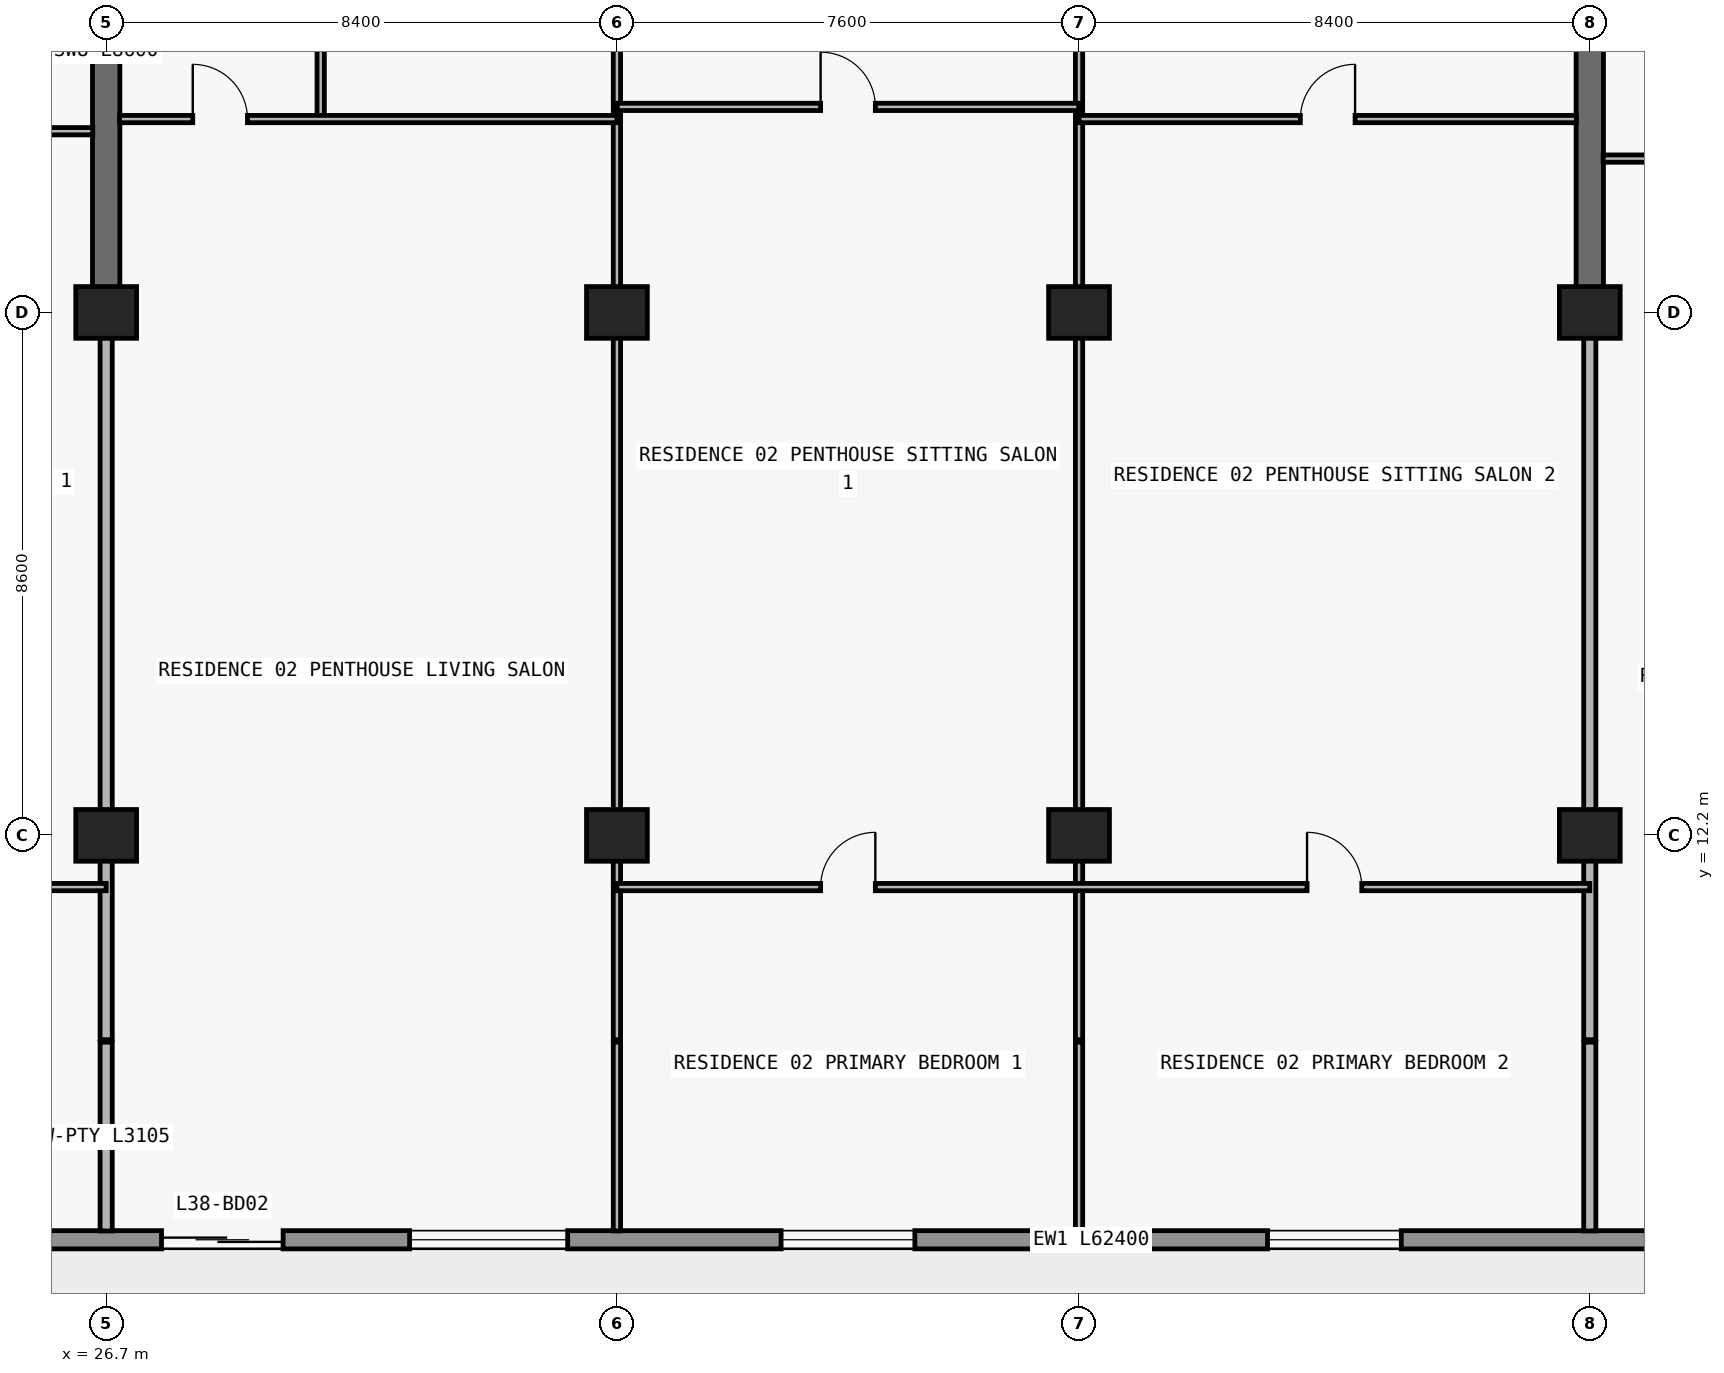
"""IFC4 building model, lengths in metres.
Left out: names, types, materials, properties, quantities, classifications, styles, units other than length and angle.
Written with IfcOpenShell. Run it as: python <this file> out.ifc"""

import sys

from ifc_helpers import new_model, si_unit, direction, frame, frame_2d, origin, origin_2d, place, context, subcontext, project, spatial, rectangle, extrude, element, fill, save


model = new_model("IFC4")
c1 = context("Model", 3, precision=1e-05, world=origin(), true_north=direction((0.0, 1.0)))
c2 = subcontext(c1, "Body", "Model", "MODEL_VIEW")
j1 = project(units=[si_unit("LENGTHUNIT", "METRE"), si_unit("PLANEANGLEUNIT", "RADIAN")], contexts=[c1])
p1 = place(None, origin())
s1 = spatial("IfcSite", under=j1, at=p1, CompositionType="ELEMENT")
p2 = place(p1, origin())
s2 = spatial("IfcBuilding", under=s1, at=p2, CompositionType="ELEMENT")
p3 = place(p2, frame((0.0, 0.0, 138.9)))
s3 = spatial("IfcBuildingStorey", under=s2, at=p3, CompositionType="ELEMENT", Elevation=138.9)
for number, where, z_axis, x_axis in (
    (1, (26.7, 12.2, 0.0), (0.0, 0.0, 1.0), (1.0, 0.0, 0.0)),
    (2, (35.1, 12.2, 0.0), (0.0, 0.0, 1.0), (1.0, 0.0, 0.0)),
    (3, (42.7, 12.2, 0.0), (0.0, 0.0, 1.0), (1.0, 0.0, 0.0)),
    (4, (51.1, 12.2, 0.0), (0.0, 0.0, 1.0), (1.0, 0.0, 0.0)),
    (5, (26.7, 20.8, 0.0), (0.0, 0.0, 1.0), (1.0, 0.0, 0.0)),
    (6, (35.1, 20.8, 0.0), (0.0, 0.0, 1.0), (1.0, 0.0, 0.0)),
    (7, (42.7, 20.8, 0.0), (0.0, 0.0, 1.0), (1.0, 0.0, 0.0)),
    (8, (51.1, 20.8, 0.0), (0.0, 0.0, 1.0), (1.0, 0.0, 0.0)),
):
    element("IfcColumn", number, at=place(p3, frame(where, z_axis=z_axis, x_axis=x_axis)), inside=s3, PredefinedType="COLUMN", context=c2, shape_type="SweptSolid", body=[
        extrude(rectangle(XDim=1.0, YDim=0.85, at=origin_2d()), origin(), (0.0, 0.0, 1.0), 3.05),
    ])
for number, where, z_axis, x_axis in (
    (9, (26.7, 20.8, 0.0), (0.0, 0.0, 1.0), (0.0, 1.0, 0.0)),
    (10, (51.1, 20.8, 0.0), (0.0, 0.0, 1.0), (0.0, 1.0, 0.0)),
):
    element("IfcWall", number, at=place(p3, frame(where, z_axis=z_axis, x_axis=x_axis)), inside=s3, PredefinedType="SHEAR", context=c2, shape_type="SweptSolid", body=[
        extrude(rectangle(XDim=8.6, YDim=0.45, at=frame_2d((4.3, 0.0))), origin(), (0.0, 0.0, 1.0), 3.05),
    ])
p4 = place(p3, frame((70.1, 5.55, 0.0), z_axis=(0.0, 0.0, 1.0), x_axis=(-1.0, 0.0, 0.0)))
e11 = element("IfcWall", 11, at=p4, inside=s3, PredefinedType="STANDARD", context=c2, shape_type="SweptSolid", body=[
    extrude(rectangle(XDim=62.4, YDim=0.3, at=frame_2d((31.2, 0.0))), origin(), (0.0, 0.0, 1.0), 3.05),
])
p5 = place(p4, frame((57.29, 0.0, 0.0)))
e12 = element("IfcOpeningElement", 12, at=p5, cuts=e11, PredefinedType="OPENING", context=c2, shape_type="SweptSolid", body=[
    extrude(rectangle(XDim=2.0, YDim=2.3, at=frame_2d((1.0, 1.15))), frame((0.0, 0.16, 0.0), z_axis=(0.0, -1.0, 0.0), x_axis=(1.0, 0.0, 0.0)), (0.0, 0.0, 1.0), 0.32),
])
p6 = place(p4, frame((52.61, 0.0, 0.65)))
e13 = element("IfcOpeningElement", 13, at=p6, cuts=e11, PredefinedType="OPENING", context=c2, shape_type="SweptSolid", body=[
    extrude(rectangle(XDim=2.6, YDim=1.85, at=frame_2d((1.3, 0.925))), frame((0.0, 0.16, 0.0), z_axis=(0.0, -1.0, 0.0), x_axis=(1.0, 0.0, 0.0)), (0.0, 0.0, 1.0), 0.32),
])
p7 = place(p4, frame((46.5, 0.0, 0.85)))
e14 = element("IfcOpeningElement", 14, at=p7, cuts=e11, PredefinedType="OPENING", context=c2, shape_type="SweptSolid", body=[
    extrude(rectangle(XDim=2.2, YDim=1.55, at=frame_2d((1.1, 0.775))), frame((0.0, 0.16, 0.0), z_axis=(0.0, -1.0, 0.0), x_axis=(1.0, 0.0, 0.0)), (0.0, 0.0, 1.0), 0.32),
])
p8 = place(p4, frame((40.49, 0.0, 0.0)))
e15 = element("IfcOpeningElement", 15, at=p8, cuts=e11, PredefinedType="OPENING", context=c2, shape_type="SweptSolid", body=[
    extrude(rectangle(XDim=2.0, YDim=2.3, at=frame_2d((1.0, 1.15))), frame((0.0, 0.16, 0.0), z_axis=(0.0, -1.0, 0.0), x_axis=(1.0, 0.0, 0.0)), (0.0, 0.0, 1.0), 0.32),
])
p9 = place(p4, frame((35.81, 0.0, 0.65)))
e16 = element("IfcOpeningElement", 16, at=p9, cuts=e11, PredefinedType="OPENING", context=c2, shape_type="SweptSolid", body=[
    extrude(rectangle(XDim=2.6, YDim=1.85, at=frame_2d((1.3, 0.925))), frame((0.0, 0.16, 0.0), z_axis=(0.0, -1.0, 0.0), x_axis=(1.0, 0.0, 0.0)), (0.0, 0.0, 1.0), 0.32),
])
p10 = place(p4, frame((30.1, 0.0, 0.85)))
e17 = element("IfcOpeningElement", 17, at=p10, cuts=e11, PredefinedType="OPENING", context=c2, shape_type="SweptSolid", body=[
    extrude(rectangle(XDim=2.2, YDim=1.55, at=frame_2d((1.1, 0.775))), frame((0.0, 0.16, 0.0), z_axis=(0.0, -1.0, 0.0), x_axis=(1.0, 0.0, 0.0)), (0.0, 0.0, 1.0), 0.32),
])
p11 = place(p4, frame((22.1, 0.0, 0.85)))
e18 = element("IfcOpeningElement", 18, at=p11, cuts=e11, PredefinedType="OPENING", context=c2, shape_type="SweptSolid", body=[
    extrude(rectangle(XDim=2.2, YDim=1.55, at=frame_2d((1.1, 0.775))), frame((0.0, 0.16, 0.0), z_axis=(0.0, -1.0, 0.0), x_axis=(1.0, 0.0, 0.0)), (0.0, 0.0, 1.0), 0.32),
])
p12 = place(p4, frame((16.026, 0.0, 0.0)))
e19 = element("IfcOpeningElement", 19, at=p12, cuts=e11, PredefinedType="OPENING", context=c2, shape_type="SweptSolid", body=[
    extrude(rectangle(XDim=2.0, YDim=2.3, at=frame_2d((1.0, 1.15))), frame((0.0, 0.16, 0.0), z_axis=(0.0, -1.0, 0.0), x_axis=(1.0, 0.0, 0.0)), (0.0, 0.0, 1.0), 0.32),
])
p13 = place(p4, frame((11.726, 0.0, 0.85)))
e20 = element("IfcOpeningElement", 20, at=p13, cuts=e11, PredefinedType="OPENING", context=c2, shape_type="SweptSolid", body=[
    extrude(rectangle(XDim=2.2, YDim=1.55, at=frame_2d((1.1, 0.775))), frame((0.0, 0.16, 0.0), z_axis=(0.0, -1.0, 0.0), x_axis=(1.0, 0.0, 0.0)), (0.0, 0.0, 1.0), 0.32),
])
p14 = place(p4, frame((7.29, 0.0, 0.0)))
e21 = element("IfcOpeningElement", 21, at=p14, cuts=e11, PredefinedType="OPENING", context=c2, shape_type="SweptSolid", body=[
    extrude(rectangle(XDim=2.0, YDim=2.3, at=frame_2d((1.0, 1.15))), frame((0.0, 0.16, 0.0), z_axis=(0.0, -1.0, 0.0), x_axis=(1.0, 0.0, 0.0)), (0.0, 0.0, 1.0), 0.32),
])
p15 = place(p4, frame((3.19, 0.0, 0.85)))
e22 = element("IfcOpeningElement", 22, at=p15, cuts=e11, PredefinedType="OPENING", context=c2, shape_type="SweptSolid", body=[
    extrude(rectangle(XDim=1.8, YDim=1.55, at=frame_2d((0.9, 0.775))), frame((0.0, 0.16, 0.0), z_axis=(0.0, -1.0, 0.0), x_axis=(1.0, 0.0, 0.0)), (0.0, 0.0, 1.0), 0.32),
])
p16 = place(p3, frame((26.7, 5.695, 0.0), z_axis=(0.0, 0.0, 1.0), x_axis=(0.0, 1.0, 0.0)))
e23 = element("IfcWall", 23, at=p16, inside=s3, PredefinedType="PARTITIONING", context=c2, shape_type="SweptSolid", body=[
    extrude(rectangle(XDim=3.105, YDim=0.2, at=frame_2d((1.552, 0.0))), origin(), (0.0, 0.0, 1.0), 3.05),
])
p17 = place(p3, frame((26.7, 8.84, 0.0), z_axis=(0.0, 0.0, 1.0), x_axis=(0.0, 1.0, 0.0)))
e24 = element("IfcWall", 24, at=p17, inside=s3, PredefinedType="PARTITIONING", context=c2, shape_type="SweptSolid", body=[
    extrude(rectangle(XDim=11.955, YDim=0.2, at=frame_2d((5.978, 0.0))), origin(), (0.0, 0.0, 1.0), 2.174),
])
p18 = place(p3, frame((30.228, 23.98, 0.0), z_axis=(0.0, 0.0, 1.0), x_axis=(0.0, 1.0, 0.0)))
e25 = element("IfcWall", 25, at=p18, inside=s3, PredefinedType="PARTITIONING", context=c2, shape_type="SweptSolid", body=[
    extrude(rectangle(XDim=4.8, YDim=0.12, at=frame_2d((2.4, 0.0))), origin(), (0.0, 0.0, 1.0), 3.05),
])
p19 = place(p18, frame((1.95, 0.0, 0.0)))
e26 = element("IfcOpeningElement", 26, at=p19, cuts=e25, PredefinedType="OPENING", context=c2, shape_type="SweptSolid", body=[
    extrude(rectangle(XDim=0.9, YDim=2.15, at=frame_2d((0.45, 1.075))), frame((0.0, 0.07, 0.0), z_axis=(0.0, -1.0, 0.0), x_axis=(1.0, 0.0, 0.0)), (0.0, 0.0, 1.0), 0.14),
])
p20 = place(p3, frame((35.1, 5.695, 0.0), z_axis=(0.0, 0.0, 1.0), x_axis=(0.0, 1.0, 0.0)))
e27 = element("IfcWall", 27, at=p20, inside=s3, PredefinedType="PARTITIONING", context=c2, shape_type="SweptSolid", body=[
    extrude(rectangle(XDim=3.105, YDim=0.12, at=frame_2d((1.552, 0.0))), origin(), (0.0, 0.0, 1.0), 3.05),
])
p21 = place(p3, frame((35.1, 8.84, 0.0), z_axis=(0.0, 0.0, 1.0), x_axis=(0.0, 1.0, 0.0)))
e28 = element("IfcWall", 28, at=p21, inside=s3, PredefinedType="PARTITIONING", context=c2, shape_type="SweptSolid", body=[
    extrude(rectangle(XDim=19.94, YDim=0.12, at=frame_2d((9.97, 0.0))), origin(), (0.0, 0.0, 1.0), 2.174),
])
p22 = place(p21, frame((17.09, 0.0, 0.0)))
e29 = element("IfcOpeningElement", 29, at=p22, cuts=e28, PredefinedType="OPENING", context=c2, shape_type="SweptSolid", body=[
    extrude(rectangle(XDim=0.9, YDim=2.124, at=frame_2d((0.45, 1.062))), frame((0.0, 0.07, 0.0), z_axis=(0.0, -1.0, 0.0), x_axis=(1.0, 0.0, 0.0)), (0.0, 0.0, 1.0), 0.14),
])
p23 = place(p3, frame((42.7, 5.695, 0.0), z_axis=(0.0, 0.0, 1.0), x_axis=(0.0, 1.0, 0.0)))
e30 = element("IfcWall", 30, at=p23, inside=s3, PredefinedType="PARTITIONING", context=c2, shape_type="SweptSolid", body=[
    extrude(rectangle(XDim=3.105, YDim=0.12, at=frame_2d((1.552, 0.0))), origin(), (0.0, 0.0, 1.0), 3.05),
])
p24 = place(p3, frame((42.7, 8.84, 0.0), z_axis=(0.0, 0.0, 1.0), x_axis=(0.0, 1.0, 0.0)))
e31 = element("IfcWall", 31, at=p24, inside=s3, PredefinedType="PARTITIONING", context=c2, shape_type="SweptSolid", body=[
    extrude(rectangle(XDim=19.94, YDim=0.12, at=frame_2d((9.97, 0.0))), origin(), (0.0, 0.0, 1.0), 2.174),
])
p25 = place(p24, frame((17.09, 0.0, 0.0)))
e32 = element("IfcOpeningElement", 32, at=p25, cuts=e31, PredefinedType="OPENING", context=c2, shape_type="SweptSolid", body=[
    extrude(rectangle(XDim=0.9, YDim=2.124, at=frame_2d((0.45, 1.062))), frame((0.0, 0.07, 0.0), z_axis=(0.0, -1.0, 0.0), x_axis=(1.0, 0.0, 0.0)), (0.0, 0.0, 1.0), 0.14),
])
p26 = place(p3, frame((51.1, 5.695, 0.0), z_axis=(0.0, 0.0, 1.0), x_axis=(0.0, 1.0, 0.0)))
e33 = element("IfcWall", 33, at=p26, inside=s3, PredefinedType="PARTITIONING", context=c2, shape_type="SweptSolid", body=[
    extrude(rectangle(XDim=3.105, YDim=0.2, at=frame_2d((1.552, 0.0))), origin(), (0.0, 0.0, 1.0), 3.05),
])
p27 = place(p3, frame((51.1, 8.84, 0.0), z_axis=(0.0, 0.0, 1.0), x_axis=(0.0, 1.0, 0.0)))
e34 = element("IfcWall", 34, at=p27, inside=s3, PredefinedType="PARTITIONING", context=c2, shape_type="SweptSolid", body=[
    extrude(rectangle(XDim=11.955, YDim=0.2, at=frame_2d((5.978, 0.0))), origin(), (0.0, 0.0, 1.0), 2.174),
])
p28 = place(p3, frame((18.3, 11.35, 0.0), z_axis=(0.0, 0.0, 1.0), x_axis=(1.0, 0.0, 0.0)))
e35 = element("IfcWall", 35, at=p28, inside=s3, PredefinedType="PARTITIONING", context=c2, shape_type="SweptSolid", body=[
    extrude(rectangle(XDim=8.4, YDim=0.12, at=frame_2d((4.2, 0.0))), origin(), (0.0, 0.0, 1.0), 3.05),
])
p29 = place(p28, frame((3.75, 0.0, 0.0)))
e36 = element("IfcOpeningElement", 36, at=p29, cuts=e35, PredefinedType="OPENING", context=c2, shape_type="SweptSolid", body=[
    extrude(rectangle(XDim=0.9, YDim=2.15, at=frame_2d((0.45, 1.075))), frame((0.0, 0.07, 0.0), z_axis=(0.0, -1.0, 0.0), x_axis=(1.0, 0.0, 0.0)), (0.0, 0.0, 1.0), 0.14),
])
p30 = place(p3, frame((35.1, 11.35, 0.0), z_axis=(0.0, 0.0, 1.0), x_axis=(1.0, 0.0, 0.0)))
e37 = element("IfcWall", 37, at=p30, inside=s3, PredefinedType="PARTITIONING", context=c2, shape_type="SweptSolid", body=[
    extrude(rectangle(XDim=16.0, YDim=0.12, at=frame_2d((8.0, 0.0))), origin(), (0.0, 0.0, 1.0), 3.05),
])
p31 = place(p30, frame((3.35, 0.0, 0.0)))
e38 = element("IfcOpeningElement", 38, at=p31, cuts=e37, PredefinedType="OPENING", context=c2, shape_type="SweptSolid", body=[
    extrude(rectangle(XDim=0.9, YDim=2.15, at=frame_2d((0.45, 1.075))), frame((0.0, 0.07, 0.0), z_axis=(0.0, -1.0, 0.0), x_axis=(1.0, 0.0, 0.0)), (0.0, 0.0, 1.0), 0.14),
])
p32 = place(p30, frame((11.35, 0.0, 0.0)))
e39 = element("IfcOpeningElement", 39, at=p32, cuts=e37, PredefinedType="OPENING", context=c2, shape_type="SweptSolid", body=[
    extrude(rectangle(XDim=0.9, YDim=2.15, at=frame_2d((0.45, 1.075))), frame((0.0, 0.07, 0.0), z_axis=(0.0, -1.0, 0.0), x_axis=(1.0, 0.0, 0.0)), (0.0, 0.0, 1.0), 0.14),
])
p33 = place(p3, frame((51.32, 23.33, 0.0), z_axis=(0.0, 0.0, 1.0), x_axis=(1.0, 0.0, 0.0)))
e40 = element("IfcWall", 40, at=p33, inside=s3, PredefinedType="PARTITIONING", context=c2, shape_type="SweptSolid", body=[
    extrude(rectangle(XDim=4.566, YDim=0.12, at=frame_2d((2.283, 0.0))), origin(), (0.0, 0.0, 1.0), 3.05),
])
p34 = place(p33, frame((1.414, 0.0, 0.0)))
e41 = element("IfcOpeningElement", 41, at=p34, cuts=e40, PredefinedType="OPENING", context=c2, shape_type="SweptSolid", body=[
    extrude(rectangle(XDim=0.9, YDim=2.15, at=frame_2d((0.45, 1.075))), frame((0.0, 0.07, 0.0), z_axis=(0.0, -1.0, 0.0), x_axis=(1.0, 0.0, 0.0)), (0.0, 0.0, 1.0), 0.14),
])
p35 = place(p3, frame((18.3, 23.78, 0.0), z_axis=(0.0, 0.0, 1.0), x_axis=(1.0, 0.0, 0.0)))
e42 = element("IfcWall", 42, at=p35, inside=s3, PredefinedType="PARTITIONING", context=c2, shape_type="SweptSolid", body=[
    extrude(rectangle(XDim=8.18, YDim=0.12, at=frame_2d((4.09, 0.0))), origin(), (0.0, 0.0, 1.0), 3.05),
])
p36 = place(p35, frame((3.64, 0.0, 0.0)))
e43 = element("IfcOpeningElement", 43, at=p36, cuts=e42, PredefinedType="OPENING", context=c2, shape_type="SweptSolid", body=[
    extrude(rectangle(XDim=0.9, YDim=2.15, at=frame_2d((0.45, 1.075))), frame((0.0, 0.07, 0.0), z_axis=(0.0, -1.0, 0.0), x_axis=(1.0, 0.0, 0.0)), (0.0, 0.0, 1.0), 0.14),
])
p37 = place(p3, frame((26.92, 23.98, 0.0), z_axis=(0.0, 0.0, 1.0), x_axis=(1.0, 0.0, 0.0)))
e44 = element("IfcWall", 44, at=p37, inside=s3, PredefinedType="PARTITIONING", context=c2, shape_type="SweptSolid", body=[
    extrude(rectangle(XDim=8.18, YDim=0.12, at=frame_2d((4.09, 0.0))), origin(), (0.0, 0.0, 1.0), 3.05),
])
p38 = place(p37, frame((1.204, 0.0, 0.0)))
e45 = element("IfcOpeningElement", 45, at=p38, cuts=e44, PredefinedType="OPENING", context=c2, shape_type="SweptSolid", body=[
    extrude(rectangle(XDim=0.9, YDim=2.15, at=frame_2d((0.45, 1.075))), frame((0.0, 0.07, 0.0), z_axis=(0.0, -1.0, 0.0), x_axis=(1.0, 0.0, 0.0)), (0.0, 0.0, 1.0), 0.14),
])
p39 = place(p3, frame((42.7, 23.98, 0.0), z_axis=(0.0, 0.0, 1.0), x_axis=(1.0, 0.0, 0.0)))
e46 = element("IfcWall", 46, at=p39, inside=s3, PredefinedType="PARTITIONING", context=c2, shape_type="SweptSolid", body=[
    extrude(rectangle(XDim=8.18, YDim=0.12, at=frame_2d((4.09, 0.0))), origin(), (0.0, 0.0, 1.0), 3.05),
])
p40 = place(p39, frame((3.64, 0.0, 0.0)))
e47 = element("IfcOpeningElement", 47, at=p40, cuts=e46, PredefinedType="OPENING", context=c2, shape_type="SweptSolid", body=[
    extrude(rectangle(XDim=0.9, YDim=2.15, at=frame_2d((0.45, 1.075))), frame((0.0, 0.07, 0.0), z_axis=(0.0, -1.0, 0.0), x_axis=(1.0, 0.0, 0.0)), (0.0, 0.0, 1.0), 0.14),
])
p41 = place(p3, frame((35.105, 24.18, 0.0), z_axis=(0.0, 0.0, 1.0), x_axis=(1.0, 0.0, 0.0)))
e48 = element("IfcWall", 48, at=p41, inside=s3, PredefinedType="PARTITIONING", context=c2, shape_type="SweptSolid", body=[
    extrude(rectangle(XDim=7.59, YDim=0.12, at=frame_2d((3.795, 0.0))), origin(), (0.0, 0.0, 1.0), 3.05),
])
p42 = place(p41, frame((3.345, 0.0, 0.0)))
e49 = element("IfcOpeningElement", 49, at=p42, cuts=e48, PredefinedType="OPENING", context=c2, shape_type="SweptSolid", body=[
    extrude(rectangle(XDim=0.9, YDim=2.15, at=frame_2d((0.45, 1.075))), frame((0.0, 0.07, 0.0), z_axis=(0.0, -1.0, 0.0), x_axis=(1.0, 0.0, 0.0)), (0.0, 0.0, 1.0), 0.14),
])
p43 = place(p8, origin())
e50 = element("IfcDoor", 50, at=p43, inside=s3, OperationType="DOUBLE_DOOR_SLIDING", PredefinedType="DOOR", context=c2, shape_type="SweptSolid", body=[
    extrude(rectangle(XDim=2.0, YDim=2.3, at=frame_2d((1.0, 1.15))), frame((0.0, 0.025, 0.0), z_axis=(0.0, -1.0, 0.0), x_axis=(1.0, 0.0, 0.0)), (0.0, 0.0, 1.0), 0.05),
])
fill(e15, e50)
p44 = place(p9, origin())
e51 = element("IfcWindow", 51, at=p44, inside=s3, PartitioningType="SINGLE_PANEL", PredefinedType="WINDOW", context=c2, shape_type="SweptSolid", body=[
    extrude(rectangle(XDim=2.6, YDim=1.85, at=frame_2d((1.3, 0.925))), frame((0.0, 0.03, 0.0), z_axis=(0.0, -1.0, 0.0), x_axis=(1.0, 0.0, 0.0)), (0.0, 0.0, 1.0), 0.06),
])
fill(e16, e51)
p45 = place(p10, origin())
e52 = element("IfcWindow", 52, at=p45, inside=s3, PartitioningType="SINGLE_PANEL", PredefinedType="WINDOW", context=c2, shape_type="SweptSolid", body=[
    extrude(rectangle(XDim=2.2, YDim=1.55, at=frame_2d((1.1, 0.775))), frame((0.0, 0.03, 0.0), z_axis=(0.0, -1.0, 0.0), x_axis=(1.0, 0.0, 0.0)), (0.0, 0.0, 1.0), 0.06),
])
fill(e17, e52)
p46 = place(p11, origin())
e53 = element("IfcWindow", 53, at=p46, inside=s3, PartitioningType="SINGLE_PANEL", PredefinedType="WINDOW", context=c2, shape_type="SweptSolid", body=[
    extrude(rectangle(XDim=2.2, YDim=1.55, at=frame_2d((1.1, 0.775))), frame((0.0, 0.03, 0.0), z_axis=(0.0, -1.0, 0.0), x_axis=(1.0, 0.0, 0.0)), (0.0, 0.0, 1.0), 0.06),
])
fill(e18, e53)
p47 = place(p38, origin())
e54 = element("IfcDoor", 54, at=p47, inside=s3, OperationType="SINGLE_SWING_LEFT", PredefinedType="DOOR", context=c2, shape_type="SweptSolid", body=[
    extrude(rectangle(XDim=0.9, YDim=2.15, at=frame_2d((0.45, 1.075))), frame((0.0, 0.025, 0.0), z_axis=(0.0, -1.0, 0.0), x_axis=(1.0, 0.0, 0.0)), (0.0, 0.0, 1.0), 0.05),
])
fill(e45, e54)
p48 = place(p42, origin())
e55 = element("IfcDoor", 55, at=p48, inside=s3, OperationType="SINGLE_SWING_LEFT", PredefinedType="DOOR", context=c2, shape_type="SweptSolid", body=[
    extrude(rectangle(XDim=0.9, YDim=2.15, at=frame_2d((0.45, 1.075))), frame((0.0, 0.025, 0.0), z_axis=(0.0, -1.0, 0.0), x_axis=(1.0, 0.0, 0.0)), (0.0, 0.0, 1.0), 0.05),
])
fill(e49, e55)
p49 = place(p31, origin())
e56 = element("IfcDoor", 56, at=p49, inside=s3, OperationType="SINGLE_SWING_RIGHT", PredefinedType="DOOR", context=c2, shape_type="SweptSolid", body=[
    extrude(rectangle(XDim=0.9, YDim=2.15, at=frame_2d((0.45, 1.075))), frame((0.0, 0.025, 0.0), z_axis=(0.0, -1.0, 0.0), x_axis=(1.0, 0.0, 0.0)), (0.0, 0.0, 1.0), 0.05),
])
fill(e38, e56)
p50 = place(p40, origin())
e57 = element("IfcDoor", 57, at=p50, inside=s3, OperationType="SINGLE_SWING_RIGHT", PredefinedType="DOOR", context=c2, shape_type="SweptSolid", body=[
    extrude(rectangle(XDim=0.9, YDim=2.15, at=frame_2d((0.45, 1.075))), frame((0.0, 0.025, 0.0), z_axis=(0.0, -1.0, 0.0), x_axis=(1.0, 0.0, 0.0)), (0.0, 0.0, 1.0), 0.05),
])
fill(e47, e57)
p51 = place(p32, origin())
e58 = element("IfcDoor", 58, at=p51, inside=s3, OperationType="SINGLE_SWING_LEFT", PredefinedType="DOOR", context=c2, shape_type="SweptSolid", body=[
    extrude(rectangle(XDim=0.9, YDim=2.15, at=frame_2d((0.45, 1.075))), frame((0.0, 0.025, 0.0), z_axis=(0.0, -1.0, 0.0), x_axis=(1.0, 0.0, 0.0)), (0.0, 0.0, 1.0), 0.05),
])
fill(e39, e58)
save(model, sys.argv[1])
